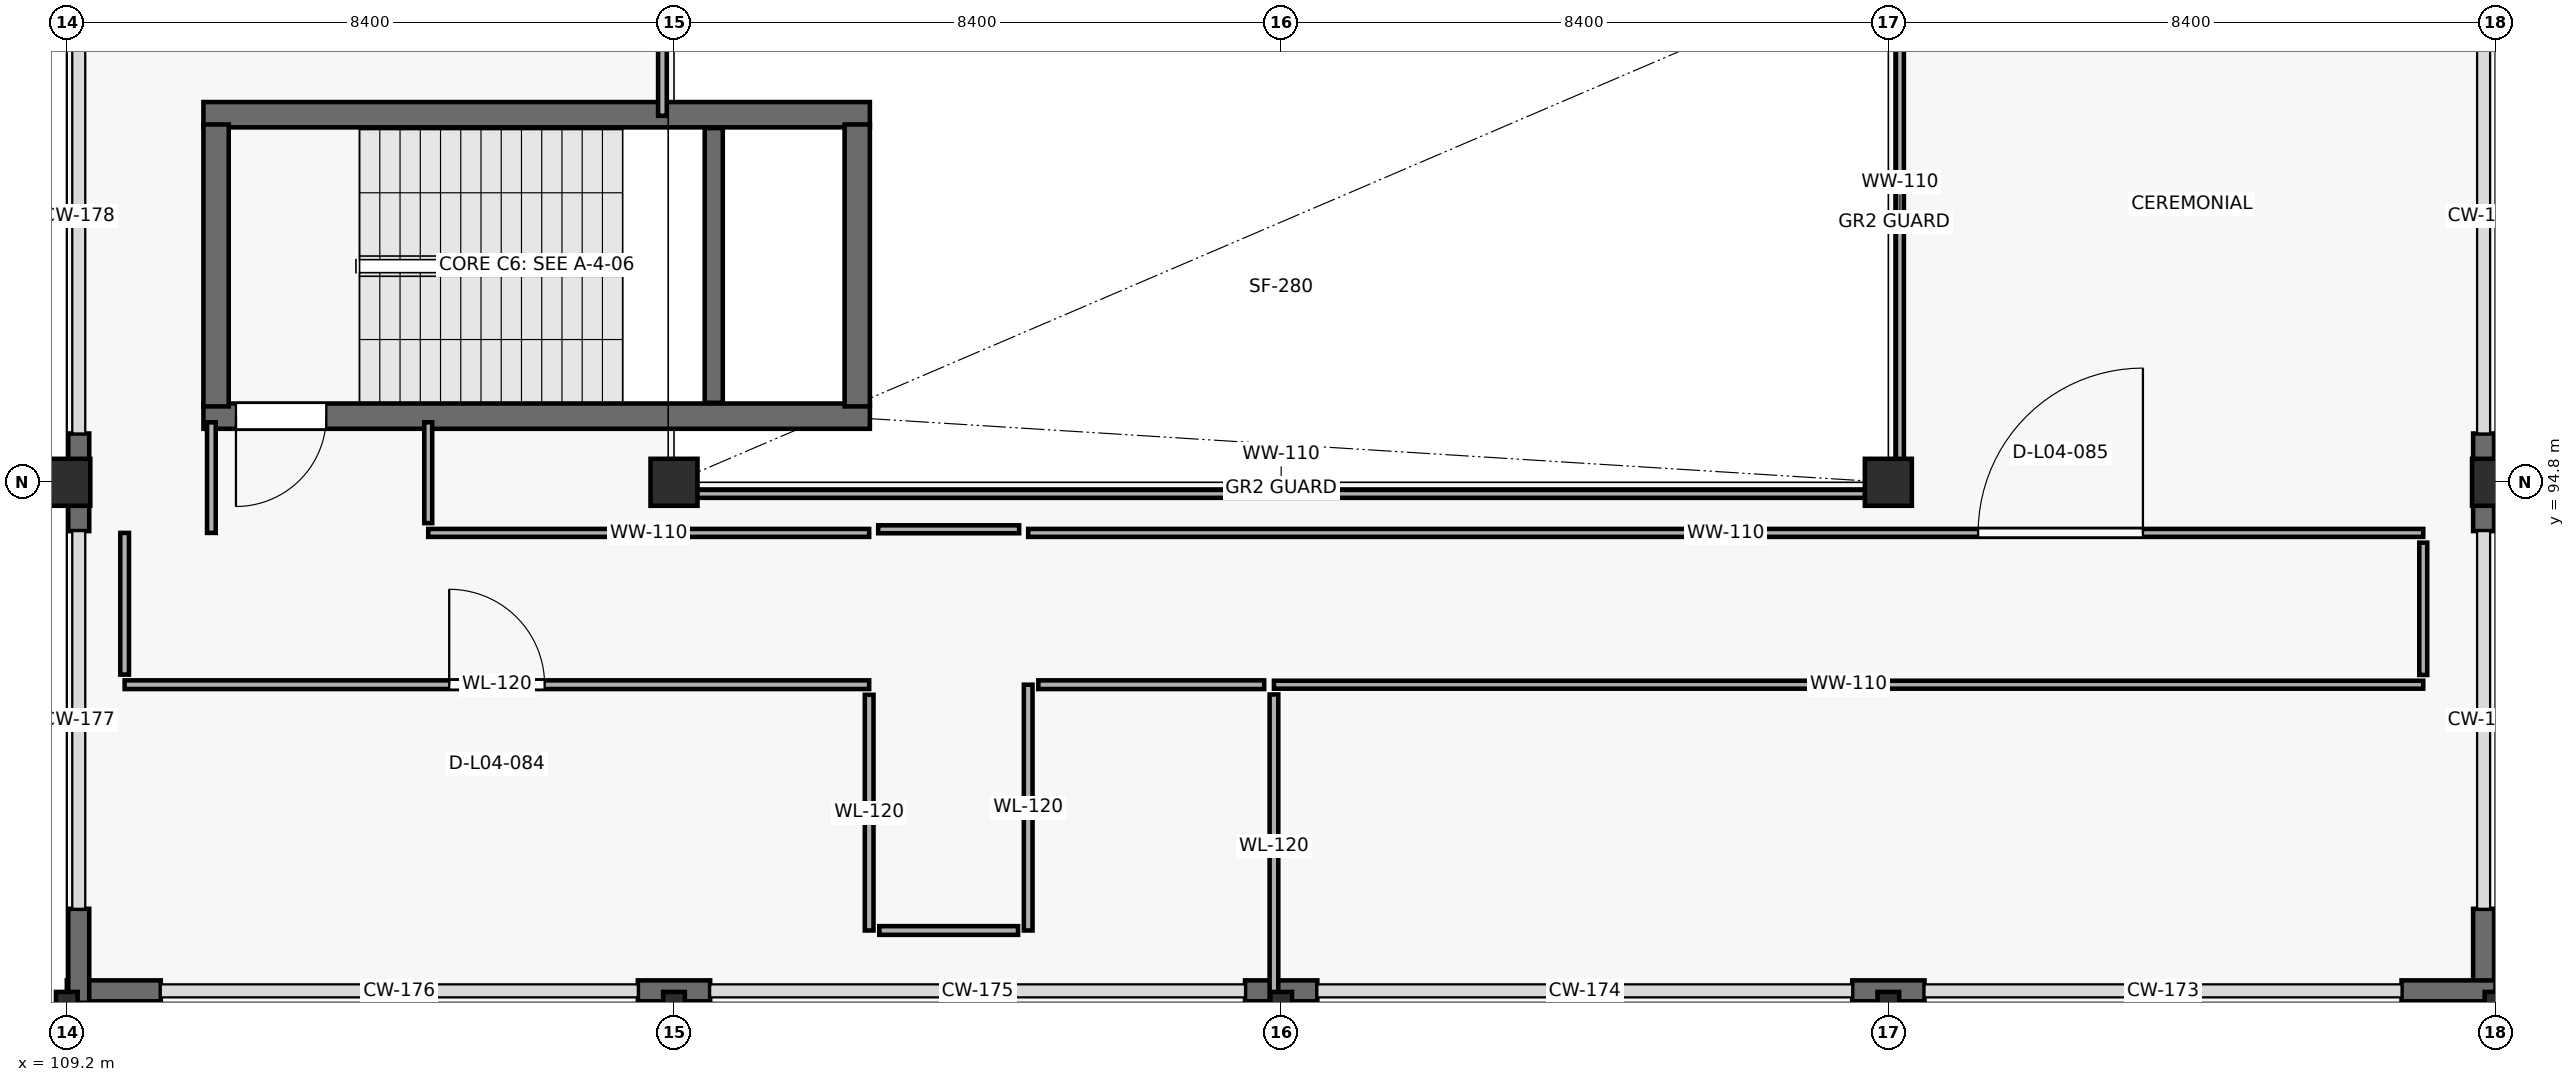
"""IFC4 building model, lengths in metres.
Left out: names, types, materials, properties, quantities, classifications, styles, units other than length and angle.
Written with IfcOpenShell. Run it as: python <this file> out.ifc"""

import sys

from ifc_helpers import new_model, si_unit, direction, frame, frame_2d, origin, origin_2d, place, context, subcontext, project, spatial, rectangle, hollow_rectangle, extrude, element, fill, save


model = new_model("IFC4")
c1 = context("Model", 3, precision=1e-05, world=origin(), true_north=direction((0.0, 1.0)))
c2 = subcontext(c1, "Body", "Model", "MODEL_VIEW")
j1 = project(units=[si_unit("LENGTHUNIT", "METRE"), si_unit("PLANEANGLEUNIT", "RADIAN")], contexts=[c1])
p1 = place(None, origin())
s1 = spatial("IfcSite", under=j1, at=p1, CompositionType="ELEMENT")
p2 = place(p1, origin())
s2 = spatial("IfcBuilding", under=s1, at=p2, CompositionType="ELEMENT")
p3 = place(p2, frame((0.0, 0.0, 15.3)))
s3 = spatial("IfcBuildingStorey", under=s2, at=p3, CompositionType="ELEMENT", Elevation=15.3)
p4 = place(p3, frame((109.2, 87.6, 0.0), z_axis=(0.0, 0.0, 1.0), x_axis=(1.0, 0.0, 0.0)))
e1 = element("IfcColumn", 1, at=p4, inside=s3, PredefinedType="COLUMN", context=c2, shape_type="SweptSolid", body=[
    extrude(hollow_rectangle(XDim=0.3, YDim=0.3, WallThickness=0.012, at=origin_2d()), origin(), (0.0, 0.0, 1.0), 5.1),
])
p5 = place(p3, frame((109.2, 94.8, 0.0), z_axis=(0.0, 0.0, 1.0), x_axis=(1.0, 0.0, 0.0)))
e2 = element("IfcColumn", 2, at=p5, inside=s3, PredefinedType="COLUMN", context=c2, shape_type="SweptSolid", body=[
    extrude(rectangle(XDim=0.65, YDim=0.65, at=origin_2d()), origin(), (0.0, 0.0, 1.0), 5.1),
])
p6 = place(p3, frame((117.6, 87.6, 0.0), z_axis=(0.0, 0.0, 1.0), x_axis=(1.0, 0.0, 0.0)))
e3 = element("IfcColumn", 3, at=p6, inside=s3, PredefinedType="COLUMN", context=c2, shape_type="SweptSolid", body=[
    extrude(hollow_rectangle(XDim=0.3, YDim=0.3, WallThickness=0.012, at=origin_2d()), origin(), (0.0, 0.0, 1.0), 5.1),
])
p7 = place(p3, frame((117.6, 94.8, 0.0), z_axis=(0.0, 0.0, 1.0), x_axis=(1.0, 0.0, 0.0)))
e4 = element("IfcColumn", 4, at=p7, inside=s3, PredefinedType="COLUMN", context=c2, shape_type="SweptSolid", body=[
    extrude(rectangle(XDim=0.65, YDim=0.65, at=origin_2d()), origin(), (0.0, 0.0, 1.0), 5.1),
])
for number, where, z_axis, x_axis in (
    (5, (126.0, 87.6, 0.0), (0.0, 0.0, 1.0), (1.0, 0.0, 0.0)),
    (6, (134.4, 87.6, 0.0), (0.0, 0.0, 1.0), (1.0, 0.0, 0.0)),
):
    element("IfcColumn", number, at=place(p3, frame(where, z_axis=z_axis, x_axis=x_axis)), inside=s3, PredefinedType="COLUMN", context=c2, shape_type="SweptSolid", body=[
        extrude(hollow_rectangle(XDim=0.3, YDim=0.3, WallThickness=0.012, at=origin_2d()), origin(), (0.0, 0.0, 1.0), 5.1),
    ])
p8 = place(p3, frame((134.4, 94.8, 0.0), z_axis=(0.0, 0.0, 1.0), x_axis=(1.0, 0.0, 0.0)))
e7 = element("IfcColumn", 7, at=p8, inside=s3, PredefinedType="COLUMN", context=c2, shape_type="SweptSolid", body=[
    extrude(rectangle(XDim=0.65, YDim=0.65, at=origin_2d()), origin(), (0.0, 0.0, 1.0), 5.1),
])
p9 = place(p3, frame((142.8, 87.6, 0.0), z_axis=(0.0, 0.0, 1.0), x_axis=(1.0, 0.0, 0.0)))
e8 = element("IfcColumn", 8, at=p9, inside=s3, PredefinedType="COLUMN", context=c2, shape_type="SweptSolid", body=[
    extrude(hollow_rectangle(XDim=0.3, YDim=0.3, WallThickness=0.012, at=origin_2d()), origin(), (0.0, 0.0, 1.0), 5.1),
])
p10 = place(p3, frame((142.8, 94.8, 0.0), z_axis=(0.0, 0.0, 1.0), x_axis=(1.0, 0.0, 0.0)))
e9 = element("IfcColumn", 9, at=p10, inside=s3, PredefinedType="COLUMN", context=c2, shape_type="SweptSolid", body=[
    extrude(rectangle(XDim=0.65, YDim=0.65, at=origin_2d()), origin(), (0.0, 0.0, 1.0), 5.1),
])
p11 = place(p3, frame((142.635, 95.475, 0.0), z_axis=(0.0, 0.0, 1.0), x_axis=(0.0, -1.0, 0.0)))
e10 = element("IfcWall", 10, at=p11, inside=s3, PredefinedType="SOLIDWALL", context=c2, shape_type="SweptSolid", body=[
    extrude(rectangle(XDim=1.35, YDim=0.29, at=frame_2d((0.675, 0.0))), origin(), (0.0, 0.0, 1.0), 4.82),
])
p12 = place(p3, frame((142.635, 88.9, 0.0), z_axis=(0.0, 0.0, 1.0), x_axis=(0.0, -1.0, 0.0)))
e11 = element("IfcWall", 11, at=p12, inside=s3, PredefinedType="SOLIDWALL", context=c2, shape_type="SweptSolid", body=[
    extrude(rectangle(XDim=1.3, YDim=0.29, at=frame_2d((0.65, 0.0))), origin(), (0.0, 0.0, 1.0), 4.82),
])
p13 = place(p3, frame((142.8, 87.765, 0.0), z_axis=(0.0, 0.0, 1.0), x_axis=(-1.0, 0.0, 0.0)))
e12 = element("IfcWall", 12, at=p13, inside=s3, PredefinedType="SOLIDWALL", context=c2, shape_type="SweptSolid", body=[
    extrude(rectangle(XDim=1.3, YDim=0.29, at=frame_2d((0.65, 0.0))), origin(), (0.0, 0.0, 1.0), 4.82),
])
for number, where, z_axis, x_axis in (
    (13, (134.9, 87.765, 0.0), (0.0, 0.0, 1.0), (-1.0, 0.0, 0.0)),
    (14, (126.5, 87.765, 0.0), (0.0, 0.0, 1.0), (-1.0, 0.0, 0.0)),
    (15, (118.1, 87.765, 0.0), (0.0, 0.0, 1.0), (-1.0, 0.0, 0.0)),
):
    element("IfcWall", number, at=place(p3, frame(where, z_axis=z_axis, x_axis=x_axis)), inside=s3, PredefinedType="SOLIDWALL", context=c2, shape_type="SweptSolid", body=[
        extrude(rectangle(XDim=1.0, YDim=0.29, at=frame_2d((0.5, 0.0))), origin(), (0.0, 0.0, 1.0), 4.82),
    ])
p14 = place(p3, frame((110.5, 87.765, 0.0), z_axis=(0.0, 0.0, 1.0), x_axis=(-1.0, 0.0, 0.0)))
e16 = element("IfcWall", 16, at=p14, inside=s3, PredefinedType="SOLIDWALL", context=c2, shape_type="SweptSolid", body=[
    extrude(rectangle(XDim=1.3, YDim=0.29, at=frame_2d((0.65, 0.0))), origin(), (0.0, 0.0, 1.0), 4.82),
])
p15 = place(p3, frame((109.365, 87.6, 0.0), z_axis=(0.0, 0.0, 1.0), x_axis=(0.0, 1.0, 0.0)))
e17 = element("IfcWall", 17, at=p15, inside=s3, PredefinedType="SOLIDWALL", context=c2, shape_type="SweptSolid", body=[
    extrude(rectangle(XDim=1.3, YDim=0.29, at=frame_2d((0.65, 0.0))), origin(), (0.0, 0.0, 1.0), 4.82),
])
p16 = place(p3, frame((109.365, 94.125, 0.0), z_axis=(0.0, 0.0, 1.0), x_axis=(0.0, 1.0, 0.0)))
e18 = element("IfcWall", 18, at=p16, inside=s3, PredefinedType="SOLIDWALL", context=c2, shape_type="SweptSolid", body=[
    extrude(rectangle(XDim=1.35, YDim=0.29, at=frame_2d((0.675, 0.0))), origin(), (0.0, 0.0, 1.0), 4.82),
])
p17 = place(p3, frame((111.09, 95.715, 0.0), z_axis=(0.0, 0.0, 1.0), x_axis=(1.0, 0.0, 0.0)))
e19 = element("IfcWall", 19, at=p17, inside=s3, PredefinedType="SHEAR", context=c2, shape_type="SweptSolid", body=[
    extrude(rectangle(XDim=9.22, YDim=0.35, at=frame_2d((4.61, 0.0))), origin(), (0.0, 0.0, 1.0), 4.82),
])
p18 = place(p17, frame((0.45, 0.0, 0.0)))
e20 = element("IfcOpeningElement", 20, at=p18, cuts=e19, PredefinedType="OPENING", context=c2, shape_type="SweptSolid", body=[
    extrude(rectangle(XDim=1.25, YDim=2.2, at=frame_2d((0.625, 1.1))), frame((0.0, 0.185, 0.0), z_axis=(0.0, -1.0, 0.0), x_axis=(1.0, 0.0, 0.0)), (0.0, 0.0, 1.0), 0.37),
])
p19 = place(p3, frame((120.31, 99.885, 0.0), z_axis=(0.0, 0.0, 1.0), x_axis=(-1.0, 0.0, 0.0)))
e21 = element("IfcWall", 21, at=p19, inside=s3, PredefinedType="SHEAR", context=c2, shape_type="SweptSolid", body=[
    extrude(rectangle(XDim=9.22, YDim=0.35, at=frame_2d((4.61, 0.0))), origin(), (0.0, 0.0, 1.0), 4.82),
])
for number, where, z_axis, x_axis in (
    (22, (111.265, 95.85, 0.0), (0.0, 0.0, 1.0), (0.0, 1.0, 0.0)),
    (23, (120.135, 99.75, 0.0), (0.0, 0.0, 1.0), (0.0, -1.0, 0.0)),
):
    element("IfcWall", number, at=place(p3, frame(where, z_axis=z_axis, x_axis=x_axis)), inside=s3, PredefinedType="SHEAR", context=c2, shape_type="SweptSolid", body=[
        extrude(rectangle(XDim=3.9, YDim=0.35, at=frame_2d((1.95, 0.0))), origin(), (0.0, 0.0, 1.0), 4.82),
    ])
p20 = place(p3, frame((118.15, 95.9, 0.0), z_axis=(0.0, 0.0, 1.0), x_axis=(0.0, 1.0, 0.0)))
e24 = element("IfcWall", 24, at=p20, inside=s3, PredefinedType="SHEAR", context=c2, shape_type="SweptSolid", body=[
    extrude(rectangle(XDim=3.8, YDim=0.25, at=frame_2d((1.9, 0.0))), origin(), (0.0, 0.0, 1.0), 2.37),
])
p21 = place(p3, frame((141.8, 94.1, 0.0), z_axis=(0.0, 0.0, 1.0), x_axis=(-1.0, 0.0, 0.0)))
e25 = element("IfcWall", 25, at=p21, inside=s3, PredefinedType="PARTITIONING", context=c2, shape_type="SweptSolid", body=[
    extrude(rectangle(XDim=19.3, YDim=0.11, at=frame_2d((9.65, 0.0))), origin(), (0.0, 0.0, 1.0), 4.82),
])
p22 = place(p21, frame((3.878, 0.0, 0.0)))
e26 = element("IfcOpeningElement", 26, at=p22, cuts=e25, PredefinedType="OPENING", context=c2, shape_type="SweptSolid", body=[
    extrude(rectangle(XDim=2.28, YDim=2.75, at=frame_2d((1.14, 1.375))), frame((0.0, 0.065, 0.0), z_axis=(0.0, -1.0, 0.0), x_axis=(1.0, 0.0, 0.0)), (0.0, 0.0, 1.0), 0.13),
])
p23 = place(p3, frame((117.5, 94.64, 0.0), z_axis=(0.0, 0.0, 1.0), x_axis=(1.0, 0.0, 0.0)))
e27 = element("IfcWall", 27, at=p23, inside=s3, PredefinedType="PARTITIONING", context=c2, shape_type="SweptSolid", body=[
    extrude(rectangle(XDim=17.0, YDim=0.11, at=frame_2d((8.5, 0.0))), origin(), (0.0, 0.0, 1.0), 3.35),
])
p24 = place(p3, frame((125.9, 92.0, 0.0), z_axis=(0.0, 0.0, 1.0), x_axis=(1.0, 0.0, 0.0)))
e28 = element("IfcWall", 28, at=p24, inside=s3, PredefinedType="PARTITIONING", context=c2, shape_type="SweptSolid", body=[
    extrude(rectangle(XDim=15.9, YDim=0.11, at=frame_2d((7.95, 0.0))), origin(), (0.0, 0.0, 1.0), 4.82),
])
p25 = place(p3, frame((110.0, 92.0, 0.0), z_axis=(0.0, 0.0, 1.0), x_axis=(1.0, 0.0, 0.0)))
e29 = element("IfcWall", 29, at=p25, inside=s3, PredefinedType="PARTITIONING", context=c2, shape_type="SweptSolid", body=[
    extrude(rectangle(XDim=10.3, YDim=0.12, at=frame_2d((5.15, 0.0))), origin(), (0.0, 0.0, 1.0), 4.82),
])
p26 = place(p25, frame((4.49, 0.0, 0.0)))
e30 = element("IfcOpeningElement", 30, at=p26, cuts=e29, PredefinedType="OPENING", context=c2, shape_type="SweptSolid", body=[
    extrude(rectangle(XDim=1.32, YDim=2.24, at=frame_2d((0.66, 1.12))), frame((0.0, 0.07, 0.0), z_axis=(0.0, -1.0, 0.0), x_axis=(1.0, 0.0, 0.0)), (0.0, 0.0, 1.0), 0.14),
])
p27 = place(p3, frame((134.56, 94.761, 0.0), z_axis=(0.0, 0.0, 1.0), x_axis=(0.0, 1.0, 0.0)))
e31 = element("IfcWall", 31, at=p27, inside=s3, PredefinedType="PARTITIONING", context=c2, shape_type="SweptSolid", body=[
    extrude(rectangle(XDim=7.279, YDim=0.11, at=frame_2d((3.639, 0.0))), origin(), (0.0, 0.0, 1.0), 3.85),
])
p28 = place(p3, frame((120.3, 94.1, 0.0), z_axis=(0.0, 0.0, 1.0), x_axis=(-1.0, 0.0, 0.0)))
e32 = element("IfcWall", 32, at=p28, inside=s3, PredefinedType="PARTITIONING", context=c2, shape_type="SweptSolid", body=[
    extrude(rectangle(XDim=6.1, YDim=0.11, at=frame_2d((3.05, 0.0))), origin(), (0.0, 0.0, 1.0), 4.82),
])
p29 = place(p3, frame((125.9, 91.865, 0.0), z_axis=(0.0, 0.0, 1.0), x_axis=(0.0, -1.0, 0.0)))
e33 = element("IfcWall", 33, at=p29, inside=s3, PredefinedType="PARTITIONING", context=c2, shape_type="SweptSolid", body=[
    extrude(rectangle(XDim=4.205, YDim=0.12, at=frame_2d((2.103, 0.0))), origin(), (0.0, 0.0, 1.0), 3.45),
])
p30 = place(p3, frame((120.3, 91.86, 0.0), z_axis=(0.0, 0.0, 1.0), x_axis=(0.0, -1.0, 0.0)))
e34 = element("IfcWall", 34, at=p30, inside=s3, PredefinedType="PARTITIONING", context=c2, shape_type="SweptSolid", body=[
    extrude(rectangle(XDim=3.26, YDim=0.12, at=frame_2d((1.63, 0.0))), origin(), (0.0, 0.0, 1.0), 4.82),
])
p31 = place(p3, frame((122.5, 88.6, 0.0), z_axis=(0.0, 0.0, 1.0), x_axis=(0.0, 1.0, 0.0)))
e35 = element("IfcWall", 35, at=p31, inside=s3, PredefinedType="PARTITIONING", context=c2, shape_type="SweptSolid", body=[
    extrude(rectangle(XDim=3.4, YDim=0.12, at=frame_2d((1.7, 0.0))), origin(), (0.0, 0.0, 1.0), 4.82),
])
p32 = place(p3, frame((122.64, 92.0, 0.0), z_axis=(0.0, 0.0, 1.0), x_axis=(1.0, 0.0, 0.0)))
e36 = element("IfcWall", 36, at=p32, inside=s3, PredefinedType="PARTITIONING", context=c2, shape_type="SweptSolid", body=[
    extrude(rectangle(XDim=3.125, YDim=0.12, at=frame_2d((1.562, 0.0))), origin(), (0.0, 0.0, 1.0), 4.82),
])
p33 = place(p3, frame((117.44, 102.034, 0.0), z_axis=(0.0, 0.0, 1.0), x_axis=(0.0, -1.0, 0.0)))
e37 = element("IfcWall", 37, at=p33, inside=s3, PredefinedType="PARTITIONING", context=c2, shape_type="SweptSolid", body=[
    extrude(rectangle(XDim=2.164, YDim=0.12, at=frame_2d((1.082, 0.0))), origin(), (0.0, 0.0, 1.0), 4.82),
])
p34 = place(p3, frame((120.44, 88.6, 0.0), z_axis=(0.0, 0.0, 1.0), x_axis=(1.0, 0.0, 0.0)))
e38 = element("IfcWall", 38, at=p34, inside=s3, PredefinedType="PARTITIONING", context=c2, shape_type="SweptSolid", body=[
    extrude(rectangle(XDim=1.92, YDim=0.12, at=frame_2d((0.96, 0.0))), origin(), (0.0, 0.0, 1.0), 4.82),
])
p35 = place(p3, frame((122.375, 94.15, 0.0), z_axis=(0.0, 0.0, 1.0), x_axis=(-1.0, 0.0, 0.0)))
e39 = element("IfcWall", 39, at=p35, inside=s3, PredefinedType="PARTITIONING", context=c2, shape_type="SweptSolid", body=[
    extrude(rectangle(XDim=1.949, YDim=0.11, at=frame_2d((0.975, 0.0))), origin(), (0.0, 0.0, 1.0), 4.82),
])
p36 = place(p3, frame((110.0, 94.1, 0.0), z_axis=(0.0, 0.0, 1.0), x_axis=(0.0, -1.0, 0.0)))
e40 = element("IfcWall", 40, at=p36, inside=s3, PredefinedType="PARTITIONING", context=c2, shape_type="SweptSolid", body=[
    extrude(rectangle(XDim=1.96, YDim=0.12, at=frame_2d((0.98, 0.0))), origin(), (0.0, 0.0, 1.0), 4.82),
])
p37 = place(p3, frame((141.8, 92.135, 0.0), z_axis=(0.0, 0.0, 1.0), x_axis=(0.0, 1.0, 0.0)))
e41 = element("IfcWall", 41, at=p37, inside=s3, PredefinedType="PARTITIONING", context=c2, shape_type="SweptSolid", body=[
    extrude(rectangle(XDim=1.83, YDim=0.11, at=frame_2d((0.915, 0.0))), origin(), (0.0, 0.0, 1.0), 4.82),
])
p38 = place(p3, frame((111.2, 95.63, 0.0), z_axis=(0.0, 0.0, 1.0), x_axis=(0.0, -1.0, 0.0)))
e42 = element("IfcWall", 42, at=p38, inside=s3, PredefinedType="PARTITIONING", context=c2, shape_type="SweptSolid", body=[
    extrude(rectangle(XDim=1.53, YDim=0.12, at=frame_2d((0.765, 0.0))), origin(), (0.0, 0.0, 1.0), 4.82),
])
p39 = place(p3, frame((114.2, 94.235, 0.0), z_axis=(0.0, 0.0, 1.0), x_axis=(0.0, 1.0, 0.0)))
e43 = element("IfcWall", 43, at=p39, inside=s3, PredefinedType="PARTITIONING", context=c2, shape_type="SweptSolid", body=[
    extrude(rectangle(XDim=1.395, YDim=0.11, at=frame_2d((0.697, 0.0))), origin(), (0.0, 0.0, 1.0), 4.82),
])
p40 = place(p18, origin())
e44 = element("IfcDoor", 44, at=p40, inside=s3, OperationType="SINGLE_SWING_RIGHT", PredefinedType="DOOR", context=c2, shape_type="SweptSolid", body=[
    extrude(rectangle(XDim=1.25, YDim=2.2, at=frame_2d((0.625, 1.1))), frame((0.0, 0.025, 0.0), z_axis=(0.0, -1.0, 0.0), x_axis=(1.0, 0.0, 0.0)), (0.0, 0.0, 1.0), 0.05),
])
fill(e20, e44)
p41 = place(p26, origin())
e45 = element("IfcDoor", 45, at=p41, inside=s3, OperationType="SINGLE_SWING_LEFT", PredefinedType="DOOR", context=c2, shape_type="SweptSolid", body=[
    extrude(rectangle(XDim=1.32, YDim=2.24, at=frame_2d((0.66, 1.12))), frame((0.0, 0.025, 0.0), z_axis=(0.0, -1.0, 0.0), x_axis=(1.0, 0.0, 0.0)), (0.0, 0.0, 1.0), 0.05),
])
fill(e30, e45)
p42 = place(p22, origin())
e46 = element("IfcDoor", 46, at=p42, inside=s3, OperationType="SINGLE_SWING_RIGHT", PredefinedType="DOOR", context=c2, shape_type="SweptSolid", body=[
    extrude(rectangle(XDim=2.28, YDim=2.75, at=frame_2d((1.14, 1.375))), frame((0.0, 0.025, 0.0), z_axis=(0.0, -1.0, 0.0), x_axis=(1.0, 0.0, 0.0)), (0.0, 0.0, 1.0), 0.05),
])
fill(e26, e46)
save(model, sys.argv[1])
